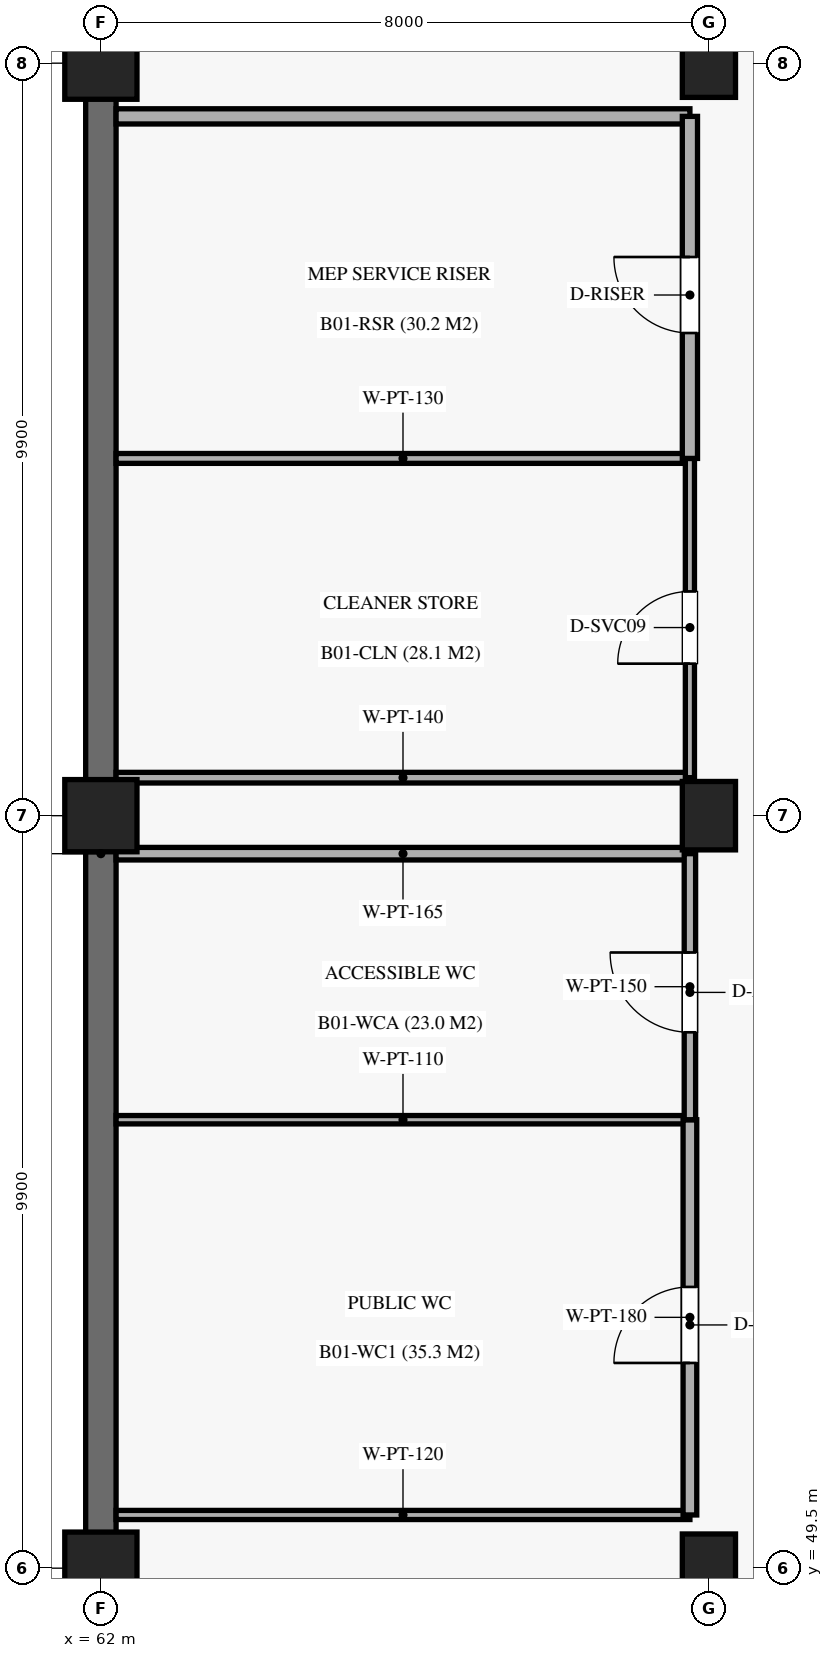
"""IFC4 building model, lengths in metres.
Left out: names, types, materials, properties, quantities, classifications, styles, units other than length and angle.
Written with IfcOpenShell. Run it as: python <this file> out.ifc"""

import sys

from ifc_helpers import new_model, si_unit, direction, frame, frame_2d, origin, origin_2d, place, context, subcontext, project, spatial, rectangle, extrude, element, fill, save


model = new_model("IFC4")
c1 = context("Model", 3, precision=1e-05, world=origin(), true_north=direction((0.0, 1.0)))
c2 = subcontext(c1, "Body", "Model", "MODEL_VIEW")
j1 = project(units=[si_unit("LENGTHUNIT", "METRE"), si_unit("PLANEANGLEUNIT", "RADIAN")], contexts=[c1])
p1 = place(None, origin())
s1 = spatial("IfcSite", under=j1, at=p1, CompositionType="ELEMENT")
p2 = place(p1, origin())
s2 = spatial("IfcBuilding", under=s1, at=p2, CompositionType="ELEMENT")
p3 = place(p2, frame((0.0, 0.0, -4.59)))
s3 = spatial("IfcBuildingStorey", under=s2, at=p3, CompositionType="ELEMENT", Elevation=-4.59)
for number, where, z_axis, x_axis in (
    (1, (62.0, 49.5, 0.0), (0.0, 0.0, 1.0), (1.0, 0.0, 0.0)),
    (2, (62.0, 59.4, 0.0), (0.0, 0.0, 1.0), (1.0, 0.0, 0.0)),
    (3, (62.0, 69.3, 0.0), (0.0, 0.0, 1.0), (1.0, 0.0, 0.0)),
):
    element("IfcColumn", number, at=place(p3, frame(where, z_axis=z_axis, x_axis=x_axis)), inside=s3, PredefinedType="COLUMN", context=c2, shape_type="SweptSolid", body=[
        extrude(rectangle(XDim=0.95, YDim=0.95, at=origin_2d()), origin(), (0.0, 0.0, 1.0), 4.59),
    ])
for number, where, z_axis, x_axis in (
    (4, (70.0, 49.5, 0.0), (0.0, 0.0, 1.0), (1.0, 0.0, 0.0)),
    (5, (70.0, 59.4, 0.0), (0.0, 0.0, 1.0), (1.0, 0.0, 0.0)),
    (6, (70.0, 69.3, 0.0), (0.0, 0.0, 1.0), (1.0, 0.0, 0.0)),
):
    element("IfcColumn", number, at=place(p3, frame(where, z_axis=z_axis, x_axis=x_axis)), inside=s3, PredefinedType="COLUMN", context=c2, shape_type="SweptSolid", body=[
        extrude(rectangle(XDim=0.7, YDim=0.9, at=origin_2d()), origin(), (0.0, 0.0, 1.0), 4.59),
    ])
p4 = place(p3, frame((62.0, 79.2, 0.0), z_axis=(0.0, 0.0, 1.0), x_axis=(0.0, -1.0, 0.0)))
e7 = element("IfcWall", 7, at=p4, inside=s3, PredefinedType="USERDEFINED", context=c2, shape_type="SweptSolid", body=[
    extrude(rectangle(XDim=79.2, YDim=0.4, at=frame_2d((39.6, 0.0))), origin(), (0.0, 0.0, 1.0), 3.64),
])
p5 = place(p3, frame((62.2, 50.2, 0.0), z_axis=(0.0, 0.0, 1.0), x_axis=(1.0, 0.0, 0.0)))
e8 = element("IfcWall", 8, at=p5, inside=s3, PredefinedType="PARTITIONING", context=c2, shape_type="SweptSolid", body=[
    extrude(rectangle(XDim=7.55, YDim=0.12, at=frame_2d((3.775, 0.0))), origin(), (0.0, 0.0, 1.0), 3.41),
])
p6 = place(p3, frame((62.2, 55.4, 0.0), z_axis=(0.0, 0.0, 1.0), x_axis=(1.0, 0.0, 0.0)))
e9 = element("IfcWall", 9, at=p6, inside=s3, PredefinedType="PARTITIONING", context=c2, shape_type="SweptSolid", body=[
    extrude(rectangle(XDim=7.55, YDim=0.11, at=frame_2d((3.775, 0.0))), origin(), (0.0, 0.0, 1.0), 3.41),
])
p7 = place(p3, frame((69.75, 50.2, 0.0), z_axis=(0.0, 0.0, 1.0), x_axis=(0.0, 1.0, 0.0)))
e10 = element("IfcWall", 10, at=p7, inside=s3, PredefinedType="PARTITIONING", context=c2, shape_type="SweptSolid", body=[
    extrude(rectangle(XDim=5.2, YDim=0.18, at=frame_2d((2.6, 0.0))), origin(), (0.0, 0.0, 1.0), 3.41),
])
p8 = place(p7, frame((2.0, 0.0, 0.0)))
e11 = element("IfcOpeningElement", 11, at=p8, cuts=e10, PredefinedType="OPENING", context=c2, shape_type="SweptSolid", body=[
    extrude(rectangle(XDim=1.0, YDim=2.1, at=frame_2d((0.5, 1.05))), frame((0.0, 0.1, 0.0), z_axis=(0.0, -1.0, 0.0), x_axis=(1.0, 0.0, 0.0)), (0.0, 0.0, 1.0), 0.2),
])
p9 = place(p3, frame((62.2, 58.9, 0.0), z_axis=(0.0, 0.0, 1.0), x_axis=(1.0, 0.0, 0.0)))
e12 = element("IfcWall", 12, at=p9, inside=s3, PredefinedType="PARTITIONING", context=c2, shape_type="SweptSolid", body=[
    extrude(rectangle(XDim=7.55, YDim=0.165, at=frame_2d((3.775, 0.0))), origin(), (0.0, 0.0, 1.0), 3.41),
])
p10 = place(p3, frame((69.75, 55.4, 0.0), z_axis=(0.0, 0.0, 1.0), x_axis=(0.0, 1.0, 0.0)))
e13 = element("IfcWall", 13, at=p10, inside=s3, PredefinedType="PARTITIONING", context=c2, shape_type="SweptSolid", body=[
    extrude(rectangle(XDim=3.5, YDim=0.15, at=frame_2d((1.75, 0.0))), origin(), (0.0, 0.0, 1.0), 3.41),
])
p11 = place(p10, frame((1.15, 0.0, 0.0)))
e14 = element("IfcOpeningElement", 14, at=p11, cuts=e13, PredefinedType="OPENING", context=c2, shape_type="SweptSolid", body=[
    extrude(rectangle(XDim=1.05, YDim=2.15, at=frame_2d((0.525, 1.075))), frame((0.0, 0.085, 0.0), z_axis=(0.0, -1.0, 0.0), x_axis=(1.0, 0.0, 0.0)), (0.0, 0.0, 1.0), 0.17),
])
p12 = place(p3, frame((62.2, 59.9, 0.0), z_axis=(0.0, 0.0, 1.0), x_axis=(1.0, 0.0, 0.0)))
e15 = element("IfcWall", 15, at=p12, inside=s3, PredefinedType="PARTITIONING", context=c2, shape_type="SweptSolid", body=[
    extrude(rectangle(XDim=7.55, YDim=0.14, at=frame_2d((3.775, 0.0))), origin(), (0.0, 0.0, 1.0), 3.41),
])
p13 = place(p3, frame((62.2, 64.1, 0.0), z_axis=(0.0, 0.0, 1.0), x_axis=(1.0, 0.0, 0.0)))
e16 = element("IfcWall", 16, at=p13, inside=s3, PredefinedType="PARTITIONING", context=c2, shape_type="SweptSolid", body=[
    extrude(rectangle(XDim=7.55, YDim=0.13, at=frame_2d((3.775, 0.0))), origin(), (0.0, 0.0, 1.0), 3.41),
])
p14 = place(p3, frame((69.75, 59.9, 0.0), z_axis=(0.0, 0.0, 1.0), x_axis=(0.0, 1.0, 0.0)))
e17 = element("IfcWall", 17, at=p14, inside=s3, PredefinedType="PARTITIONING", context=c2, shape_type="SweptSolid", body=[
    extrude(rectangle(XDim=4.2, YDim=0.12, at=frame_2d((2.1, 0.0))), origin(), (0.0, 0.0, 1.0), 3.41),
])
p15 = place(p14, frame((1.5, 0.0, 0.0)))
e18 = element("IfcOpeningElement", 18, at=p15, cuts=e17, PredefinedType="OPENING", context=c2, shape_type="SweptSolid", body=[
    extrude(rectangle(XDim=0.95, YDim=2.1, at=frame_2d((0.475, 1.05))), frame((0.0, 0.07, 0.0), z_axis=(0.0, -1.0, 0.0), x_axis=(1.0, 0.0, 0.0)), (0.0, 0.0, 1.0), 0.14),
])
p16 = place(p3, frame((62.2, 68.6, 0.0), z_axis=(0.0, 0.0, 1.0), x_axis=(1.0, 0.0, 0.0)))
e19 = element("IfcWall", 19, at=p16, inside=s3, PredefinedType="SOLIDWALL", context=c2, shape_type="SweptSolid", body=[
    extrude(rectangle(XDim=7.55, YDim=0.2, at=frame_2d((3.775, 0.0))), origin(), (0.0, 0.0, 1.0), 3.41),
])
p17 = place(p3, frame((69.75, 64.1, 0.0), z_axis=(0.0, 0.0, 1.0), x_axis=(0.0, 1.0, 0.0)))
e20 = element("IfcWall", 20, at=p17, inside=s3, PredefinedType="SOLIDWALL", context=c2, shape_type="SweptSolid", body=[
    extrude(rectangle(XDim=4.5, YDim=0.2, at=frame_2d((2.25, 0.0))), origin(), (0.0, 0.0, 1.0), 3.41),
])
p18 = place(p17, frame((1.65, 0.0, 0.0)))
e21 = element("IfcOpeningElement", 21, at=p18, cuts=e20, PredefinedType="OPENING", context=c2, shape_type="SweptSolid", body=[
    extrude(rectangle(XDim=1.0, YDim=2.15, at=frame_2d((0.5, 1.075))), frame((0.0, 0.11, 0.0), z_axis=(0.0, -1.0, 0.0), x_axis=(1.0, 0.0, 0.0)), (0.0, 0.0, 1.0), 0.22),
])
p19 = place(p8, origin())
e22 = element("IfcDoor", 22, at=p19, inside=s3, OperationType="SINGLE_SWING_LEFT", PredefinedType="DOOR", context=c2, shape_type="SweptSolid", body=[
    extrude(rectangle(XDim=1.0, YDim=2.1, at=frame_2d((0.5, 1.05))), frame((0.0, 0.025, 0.0), z_axis=(0.0, -1.0, 0.0), x_axis=(1.0, 0.0, 0.0)), (0.0, 0.0, 1.0), 0.05),
])
fill(e11, e22)
p20 = place(p11, origin())
e23 = element("IfcDoor", 23, at=p20, inside=s3, OperationType="SINGLE_SWING_RIGHT", PredefinedType="DOOR", context=c2, shape_type="SweptSolid", body=[
    extrude(rectangle(XDim=1.05, YDim=2.15, at=frame_2d((0.525, 1.075))), frame((0.0, 0.025, 0.0), z_axis=(0.0, -1.0, 0.0), x_axis=(1.0, 0.0, 0.0)), (0.0, 0.0, 1.0), 0.05),
])
fill(e14, e23)
p21 = place(p15, origin())
e24 = element("IfcDoor", 24, at=p21, inside=s3, OperationType="SINGLE_SWING_LEFT", PredefinedType="DOOR", context=c2, shape_type="SweptSolid", body=[
    extrude(rectangle(XDim=0.95, YDim=2.1, at=frame_2d((0.475, 1.05))), frame((0.0, 0.025, 0.0), z_axis=(0.0, -1.0, 0.0), x_axis=(1.0, 0.0, 0.0)), (0.0, 0.0, 1.0), 0.05),
])
fill(e18, e24)
p22 = place(p18, origin())
e25 = element("IfcDoor", 25, at=p22, inside=s3, OperationType="SINGLE_SWING_RIGHT", PredefinedType="DOOR", context=c2, shape_type="SweptSolid", body=[
    extrude(rectangle(XDim=1.0, YDim=2.15, at=frame_2d((0.5, 1.075))), frame((0.0, 0.025, 0.0), z_axis=(0.0, -1.0, 0.0), x_axis=(1.0, 0.0, 0.0)), (0.0, 0.0, 1.0), 0.05),
])
fill(e21, e25)
save(model, sys.argv[1])
